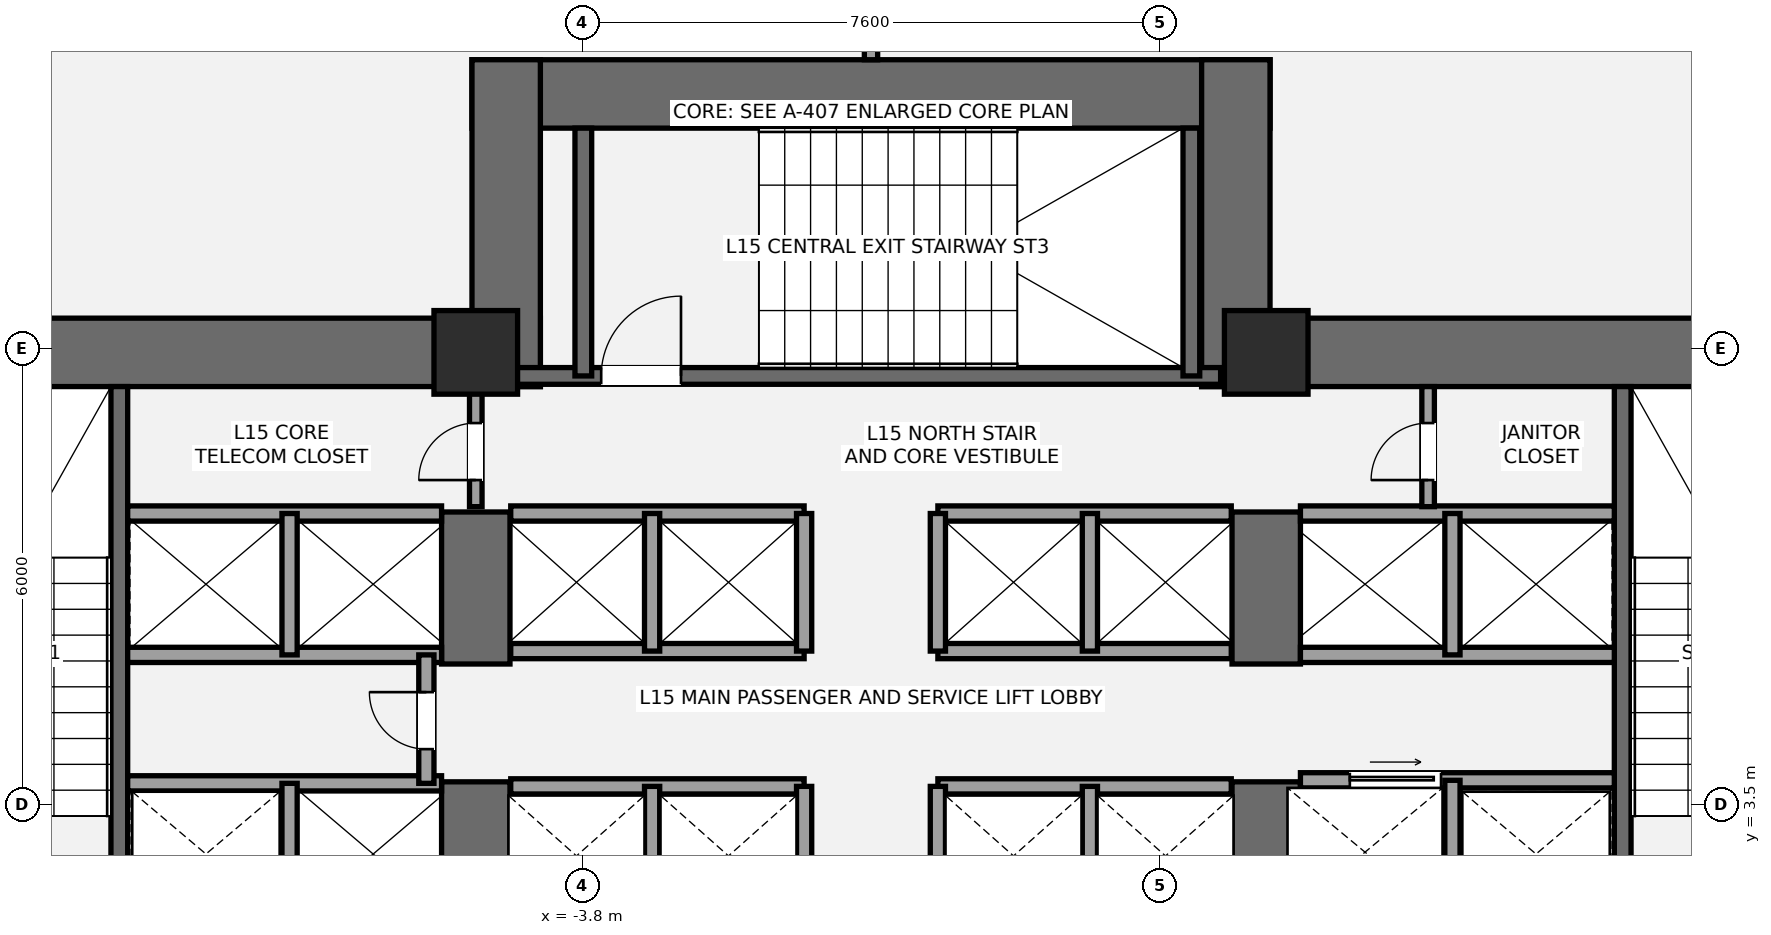
"""IFC4 building model, lengths in metres.
Left out: names, types, materials, properties, quantities, classifications, styles, units other than length and angle.
Written with IfcOpenShell. Run it as: python <this file> out.ifc"""

import sys

from ifc_helpers import new_model, si_unit, direction, frame, frame_2d, origin, origin_2d, place, context, subcontext, project, spatial, rectangle, extrude, element, fill, save


model = new_model("IFC4")
c1 = context("Model", 3, precision=1e-05, world=origin(), true_north=direction((0.0, 1.0)))
c2 = subcontext(c1, "Body", "Model", "MODEL_VIEW")
j1 = project(units=[si_unit("LENGTHUNIT", "METRE"), si_unit("PLANEANGLEUNIT", "RADIAN")], contexts=[c1])
p1 = place(None, origin())
s1 = spatial("IfcSite", under=j1, at=p1, CompositionType="ELEMENT")
p2 = place(p1, origin())
s2 = spatial("IfcBuilding", under=s1, at=p2, CompositionType="ELEMENT")
p3 = place(p2, frame((0.0, 0.0, 59.4)))
s3 = spatial("IfcBuildingStorey", under=s2, at=p3, CompositionType="ELEMENT", Elevation=59.4)
p4 = place(p3, frame((-14.05, 9.45, 0.0), z_axis=(0.0, 0.0, 1.0), x_axis=(1.0, 0.0, 0.0)))
e1 = element("IfcWall", 1, at=p4, inside=s3, PredefinedType="SHEAR", context=c2, shape_type="SweptSolid", body=[
    extrude(rectangle(XDim=9.7, YDim=0.9, at=frame_2d((4.85, 0.0))), origin(), (0.0, 0.0, 1.0), 3.6),
])
p5 = place(p3, frame((-5.2, 0.95, 0.0), z_axis=(0.0, 0.0, 1.0), x_axis=(0.0, 1.0, 0.0)))
e2 = element("IfcWall", 2, at=p5, inside=s3, PredefinedType="SHEAR", context=c2, shape_type="SweptSolid", body=[
    extrude(rectangle(XDim=2.85, YDim=0.9, at=frame_2d((1.425, 0.0))), origin(), (0.0, 0.0, 1.0), 3.6),
])
p6 = place(p3, frame((-5.2, 5.35, 0.0), z_axis=(0.0, 0.0, 1.0), x_axis=(0.0, 1.0, 0.0)))
e3 = element("IfcWall", 3, at=p6, inside=s3, PredefinedType="SHEAR", context=c2, shape_type="SweptSolid", body=[
    extrude(rectangle(XDim=2.0, YDim=0.9, at=frame_2d((1.0, 0.0))), origin(), (0.0, 0.0, 1.0), 3.6),
])
p7 = place(p3, frame((-9.89, 1.85, 0.0), z_axis=(0.0, 0.0, 1.0), x_axis=(0.0, 1.0, 0.0)))
e4 = element("IfcWall", 4, at=p7, inside=s3, PredefinedType="SHEAR", context=c2, shape_type="SweptSolid", body=[
    extrude(rectangle(XDim=7.15, YDim=0.22, at=frame_2d((3.575, 0.0))), origin(), (0.0, 0.0, 1.0), 3.6),
])
p8 = place(p3, frame((4.35, 9.45, 0.0), z_axis=(0.0, 0.0, 1.0), x_axis=(1.0, 0.0, 0.0)))
e5 = element("IfcWall", 5, at=p8, inside=s3, PredefinedType="SHEAR", context=c2, shape_type="SweptSolid", body=[
    extrude(rectangle(XDim=9.7, YDim=0.9, at=frame_2d((4.85, 0.0))), origin(), (0.0, 0.0, 1.0), 3.6),
])
p9 = place(p3, frame((5.2, 0.95, 0.0), z_axis=(0.0, 0.0, 1.0), x_axis=(0.0, 1.0, 0.0)))
e6 = element("IfcWall", 6, at=p9, inside=s3, PredefinedType="SHEAR", context=c2, shape_type="SweptSolid", body=[
    extrude(rectangle(XDim=2.85, YDim=0.9, at=frame_2d((1.425, 0.0))), origin(), (0.0, 0.0, 1.0), 3.6),
])
p10 = place(p3, frame((5.2, 5.35, 0.0), z_axis=(0.0, 0.0, 1.0), x_axis=(0.0, 1.0, 0.0)))
e7 = element("IfcWall", 7, at=p10, inside=s3, PredefinedType="SHEAR", context=c2, shape_type="SweptSolid", body=[
    extrude(rectangle(XDim=2.0, YDim=0.9, at=frame_2d((1.0, 0.0))), origin(), (0.0, 0.0, 1.0), 3.6),
])
p11 = place(p3, frame((9.89, 1.85, 0.0), z_axis=(0.0, 0.0, 1.0), x_axis=(0.0, 1.0, 0.0)))
e8 = element("IfcWall", 8, at=p11, inside=s3, PredefinedType="SHEAR", context=c2, shape_type="SweptSolid", body=[
    extrude(rectangle(XDim=7.15, YDim=0.22, at=frame_2d((3.575, 0.0))), origin(), (0.0, 0.0, 1.0), 3.6),
])
p12 = place(p3, frame((-5.25, 12.85, 0.0), z_axis=(0.0, 0.0, 1.0), x_axis=(1.0, 0.0, 0.0)))
e9 = element("IfcWall", 9, at=p12, inside=s3, PredefinedType="SHEAR", context=c2, shape_type="SweptSolid", body=[
    extrude(rectangle(XDim=10.5, YDim=0.9, at=frame_2d((5.25, 0.0))), origin(), (0.0, 0.0, 1.0), 3.6),
])
for number, where, z_axis, x_axis in (
    (10, (-4.8, 9.0, 0.0), (0.0, 0.0, 1.0), (0.0, 1.0, 0.0)),
    (11, (4.8, 9.0, 0.0), (0.0, 0.0, 1.0), (0.0, 1.0, 0.0)),
):
    element("IfcWall", number, at=place(p3, frame(where, z_axis=z_axis, x_axis=x_axis)), inside=s3, PredefinedType="SHEAR", context=c2, shape_type="SweptSolid", body=[
        extrude(rectangle(XDim=4.3, YDim=0.9, at=frame_2d((2.15, 0.0))), origin(), (0.0, 0.0, 1.0), 3.6),
    ])
p13 = place(p3, frame((-4.7, 9.14, 0.0), z_axis=(0.0, 0.0, 1.0), x_axis=(1.0, 0.0, 0.0)))
e12 = element("IfcWall", 12, at=p13, inside=s3, PredefinedType="SHEAR", context=c2, shape_type="SweptSolid", body=[
    extrude(rectangle(XDim=9.3, YDim=0.22, at=frame_2d((4.65, 0.0))), origin(), (0.0, 0.0, 1.0), 3.6),
])
p14 = place(p13, frame((1.15, 0.0, 0.0)))
e13 = element("IfcOpeningElement", 13, at=p14, cuts=e12, PredefinedType="OPENING", context=c2, shape_type="SweptSolid", body=[
    extrude(rectangle(XDim=1.05, YDim=2.15, at=frame_2d((0.525, 1.075))), frame((0.0, 0.12, 0.0), z_axis=(0.0, -1.0, 0.0), x_axis=(1.0, 0.0, 0.0)), (0.0, 0.0, 1.0), 0.24),
])
for number, where, z_axis, x_axis in (
    (14, (-3.785, 9.14, 0.0), (0.0, 0.0, 1.0), (0.0, 1.0, 0.0)),
    (15, (4.215, 9.14, 0.0), (0.0, 0.0, 1.0), (0.0, 1.0, 0.0)),
):
    element("IfcWall", number, at=place(p3, frame(where, z_axis=z_axis, x_axis=x_axis)), inside=s3, PredefinedType="SHEAR", context=c2, shape_type="SweptSolid", body=[
        extrude(rectangle(XDim=3.26, YDim=0.22, at=frame_2d((1.63, 0.0))), origin(), (0.0, 0.0, 1.0), 3.6),
    ])
for number, where, z_axis, x_axis in (
    (16, (-5.2, 9.45, 0.0), (0.0, 0.0, 1.0), (1.0, 0.0, 0.0)),
    (17, (5.2, 9.45, 0.0), (0.0, 0.0, 1.0), (1.0, 0.0, 0.0)),
):
    element("IfcColumn", number, at=place(p3, frame(where, z_axis=z_axis, x_axis=x_axis)), inside=s3, PredefinedType="COLUMN", context=c2, shape_type="SweptSolid", body=[
        extrude(rectangle(XDim=1.1, YDim=1.1, at=origin_2d()), origin(), (0.0, 0.0, 1.0), 3.6),
    ])
p15 = place(p3, frame((-9.78, 3.78, 0.0), z_axis=(0.0, 0.0, 1.0), x_axis=(1.0, 0.0, 0.0)))
e18 = element("IfcWall", 18, at=p15, inside=s3, PredefinedType="SOLIDWALL", context=c2, shape_type="SweptSolid", body=[
    extrude(rectangle(XDim=4.13, YDim=0.2, at=frame_2d((2.065, 0.0))), origin(), (0.0, 0.0, 1.0), 3.4),
])
p16 = place(p3, frame((-7.65, 1.85, 0.0), z_axis=(0.0, 0.0, 1.0), x_axis=(0.0, 1.0, 0.0)))
e19 = element("IfcWall", 19, at=p16, inside=s3, PredefinedType="SOLIDWALL", context=c2, shape_type="SweptSolid", body=[
    extrude(rectangle(XDim=1.93, YDim=0.2, at=frame_2d((0.965, 0.0))), origin(), (0.0, 0.0, 1.0), 3.4),
])
for number, where, z_axis, x_axis in (
    (20, (-9.78, 5.47, 0.0), (0.0, 0.0, 1.0), (1.0, 0.0, 0.0)),
    (21, (-9.78, 7.33, 0.0), (0.0, 0.0, 1.0), (1.0, 0.0, 0.0)),
):
    element("IfcWall", number, at=place(p3, frame(where, z_axis=z_axis, x_axis=x_axis)), inside=s3, PredefinedType="SOLIDWALL", context=c2, shape_type="SweptSolid", body=[
        extrude(rectangle(XDim=4.13, YDim=0.2, at=frame_2d((2.065, 0.0))), origin(), (0.0, 0.0, 1.0), 3.4),
    ])
p17 = place(p3, frame((-7.65, 5.47, 0.0), z_axis=(0.0, 0.0, 1.0), x_axis=(0.0, 1.0, 0.0)))
e22 = element("IfcWall", 22, at=p17, inside=s3, PredefinedType="SOLIDWALL", context=c2, shape_type="SweptSolid", body=[
    extrude(rectangle(XDim=1.86, YDim=0.2, at=frame_2d((0.93, 0.0))), origin(), (0.0, 0.0, 1.0), 3.4),
])
p18 = place(p3, frame((-5.85, 3.78, 0.0), z_axis=(0.0, 0.0, 1.0), x_axis=(0.0, 1.0, 0.0)))
e23 = element("IfcWall", 23, at=p18, inside=s3, PredefinedType="SOLIDWALL", context=c2, shape_type="SweptSolid", body=[
    extrude(rectangle(XDim=1.69, YDim=0.2, at=frame_2d((0.845, 0.0))), origin(), (0.0, 0.0, 1.0), 3.4),
])
p19 = place(p18, frame((0.45, 0.0, 0.0)))
e24 = element("IfcOpeningElement", 24, at=p19, cuts=e23, PredefinedType="OPENING", context=c2, shape_type="SweptSolid", body=[
    extrude(rectangle(XDim=0.75, YDim=2.1, at=frame_2d((0.375, 1.05))), frame((0.0, 0.11, 0.0), z_axis=(0.0, -1.0, 0.0), x_axis=(1.0, 0.0, 0.0)), (0.0, 0.0, 1.0), 0.22),
])
p20 = place(p3, frame((5.65, 3.82, 0.0), z_axis=(0.0, 0.0, 1.0), x_axis=(1.0, 0.0, 0.0)))
e25 = element("IfcWall", 25, at=p20, inside=s3, PredefinedType="SOLIDWALL", context=c2, shape_type="SweptSolid", body=[
    extrude(rectangle(XDim=4.13, YDim=0.2, at=frame_2d((2.065, 0.0))), origin(), (0.0, 0.0, 1.0), 3.4),
])
p21 = place(p20, frame((0.65, 0.0, 0.0)))
e26 = element("IfcOpeningElement", 26, at=p21, cuts=e25, PredefinedType="OPENING", context=c2, shape_type="SweptSolid", body=[
    extrude(rectangle(XDim=1.2, YDim=2.2, at=frame_2d((0.6, 1.1))), frame((0.0, 0.11, 0.0), z_axis=(0.0, -1.0, 0.0), x_axis=(1.0, 0.0, 0.0)), (0.0, 0.0, 1.0), 0.22),
])
p22 = place(p3, frame((7.65, 1.85, 0.0), z_axis=(0.0, 0.0, 1.0), x_axis=(0.0, 1.0, 0.0)))
e27 = element("IfcWall", 27, at=p22, inside=s3, PredefinedType="SOLIDWALL", context=c2, shape_type="SweptSolid", body=[
    extrude(rectangle(XDim=1.97, YDim=0.2, at=frame_2d((0.985, 0.0))), origin(), (0.0, 0.0, 1.0), 3.4),
])
for number, where, z_axis, x_axis in (
    (28, (5.65, 5.47, 0.0), (0.0, 0.0, 1.0), (1.0, 0.0, 0.0)),
    (29, (5.65, 7.33, 0.0), (0.0, 0.0, 1.0), (1.0, 0.0, 0.0)),
):
    element("IfcWall", number, at=place(p3, frame(where, z_axis=z_axis, x_axis=x_axis)), inside=s3, PredefinedType="SOLIDWALL", context=c2, shape_type="SweptSolid", body=[
        extrude(rectangle(XDim=4.13, YDim=0.2, at=frame_2d((2.065, 0.0))), origin(), (0.0, 0.0, 1.0), 3.4),
    ])
p23 = place(p3, frame((7.65, 5.47, 0.0), z_axis=(0.0, 0.0, 1.0), x_axis=(0.0, 1.0, 0.0)))
e30 = element("IfcWall", 30, at=p23, inside=s3, PredefinedType="SOLIDWALL", context=c2, shape_type="SweptSolid", body=[
    extrude(rectangle(XDim=1.86, YDim=0.2, at=frame_2d((0.93, 0.0))), origin(), (0.0, 0.0, 1.0), 3.4),
])
for number, where, z_axis, x_axis in (
    (31, (-4.74, 3.74, 0.0), (0.0, 0.0, 1.0), (1.0, 0.0, 0.0)),
    (32, (0.88, 3.74, 0.0), (0.0, 0.0, 1.0), (1.0, 0.0, 0.0)),
):
    element("IfcWall", number, at=place(p3, frame(where, z_axis=z_axis, x_axis=x_axis)), inside=s3, PredefinedType="SOLIDWALL", context=c2, shape_type="SweptSolid", body=[
        extrude(rectangle(XDim=3.86, YDim=0.2, at=frame_2d((1.93, 0.0))), origin(), (0.0, 0.0, 1.0), 3.4),
    ])
for number, where, z_axis, x_axis in (
    (33, (-2.88, 1.92, 0.0), (0.0, 0.0, 1.0), (0.0, 1.0, 0.0)),
    (34, (2.88, 1.92, 0.0), (0.0, 0.0, 1.0), (0.0, 1.0, 0.0)),
    (35, (-0.88, 1.92, 0.0), (0.0, 0.0, 1.0), (0.0, 1.0, 0.0)),
    (36, (0.88, 1.92, 0.0), (0.0, 0.0, 1.0), (0.0, 1.0, 0.0)),
):
    element("IfcWall", number, at=place(p3, frame(where, z_axis=z_axis, x_axis=x_axis)), inside=s3, PredefinedType="SOLIDWALL", context=c2, shape_type="SweptSolid", body=[
        extrude(rectangle(XDim=1.82, YDim=0.2, at=frame_2d((0.91, 0.0))), origin(), (0.0, 0.0, 1.0), 3.4),
    ])
for number, where, z_axis, x_axis in (
    (37, (-4.74, 5.52, 0.0), (0.0, 0.0, 1.0), (1.0, 0.0, 0.0)),
    (38, (0.88, 5.52, 0.0), (0.0, 0.0, 1.0), (1.0, 0.0, 0.0)),
    (39, (-4.74, 7.33, 0.0), (0.0, 0.0, 1.0), (1.0, 0.0, 0.0)),
    (40, (0.88, 7.33, 0.0), (0.0, 0.0, 1.0), (1.0, 0.0, 0.0)),
):
    element("IfcWall", number, at=place(p3, frame(where, z_axis=z_axis, x_axis=x_axis)), inside=s3, PredefinedType="SOLIDWALL", context=c2, shape_type="SweptSolid", body=[
        extrude(rectangle(XDim=3.86, YDim=0.2, at=frame_2d((1.93, 0.0))), origin(), (0.0, 0.0, 1.0), 3.4),
    ])
for number, where, z_axis, x_axis in (
    (41, (-2.88, 5.52, 0.0), (0.0, 0.0, 1.0), (0.0, 1.0, 0.0)),
    (42, (2.88, 5.52, 0.0), (0.0, 0.0, 1.0), (0.0, 1.0, 0.0)),
    (43, (-0.88, 5.52, 0.0), (0.0, 0.0, 1.0), (0.0, 1.0, 0.0)),
    (44, (0.88, 5.52, 0.0), (0.0, 0.0, 1.0), (0.0, 1.0, 0.0)),
):
    element("IfcWall", number, at=place(p3, frame(where, z_axis=z_axis, x_axis=x_axis)), inside=s3, PredefinedType="SOLIDWALL", context=c2, shape_type="SweptSolid", body=[
        extrude(rectangle(XDim=1.81, YDim=0.2, at=frame_2d((0.905, 0.0))), origin(), (0.0, 0.0, 1.0), 3.4),
    ])
p24 = place(p3, frame((-5.2, 7.42, 0.0), z_axis=(0.0, 0.0, 1.0), x_axis=(0.0, 1.0, 0.0)))
e45 = element("IfcWall", 45, at=p24, inside=s3, PredefinedType="PARTITIONING", context=c2, shape_type="SweptSolid", body=[
    extrude(rectangle(XDim=1.58, YDim=0.165, at=frame_2d((0.79, 0.0))), origin(), (0.0, 0.0, 1.0), 3.4),
])
p25 = place(p24, frame((0.35, 0.0, 0.0)))
e46 = element("IfcOpeningElement", 46, at=p25, cuts=e45, PredefinedType="OPENING", context=c2, shape_type="SweptSolid", body=[
    extrude(rectangle(XDim=0.75, YDim=2.1, at=frame_2d((0.375, 1.05))), frame((0.0, 0.093, 0.0), z_axis=(0.0, -1.0, 0.0), x_axis=(1.0, 0.0, 0.0)), (0.0, 0.0, 1.0), 0.185),
])
p26 = place(p3, frame((7.33, 7.42, 0.0), z_axis=(0.0, 0.0, 1.0), x_axis=(0.0, 1.0, 0.0)))
e47 = element("IfcWall", 47, at=p26, inside=s3, PredefinedType="PARTITIONING", context=c2, shape_type="SweptSolid", body=[
    extrude(rectangle(XDim=1.58, YDim=0.165, at=frame_2d((0.79, 0.0))), origin(), (0.0, 0.0, 1.0), 3.4),
])
p27 = place(p26, frame((0.35, 0.0, 0.0)))
e48 = element("IfcOpeningElement", 48, at=p27, cuts=e47, PredefinedType="OPENING", context=c2, shape_type="SweptSolid", body=[
    extrude(rectangle(XDim=0.75, YDim=2.1, at=frame_2d((0.375, 1.05))), frame((0.0, 0.093, 0.0), z_axis=(0.0, -1.0, 0.0), x_axis=(1.0, 0.0, 0.0)), (0.0, 0.0, 1.0), 0.185),
])
p28 = place(p3, frame((0.0, 13.3, 0.0), z_axis=(0.0, 0.0, 1.0), x_axis=(0.0, 1.0, 0.0)))
e49 = element("IfcWall", 49, at=p28, inside=s3, PredefinedType="PARTITIONING", context=c2, shape_type="SweptSolid", body=[
    extrude(rectangle(XDim=5.952, YDim=0.175, at=frame_2d((2.976, 0.0))), origin(), (0.0, 0.0, 1.0), 3.4),
])
p29 = place(p14, origin())
e50 = element("IfcDoor", 50, at=p29, inside=s3, OperationType="SINGLE_SWING_RIGHT", PredefinedType="DOOR", context=c2, shape_type="SweptSolid", body=[
    extrude(rectangle(XDim=1.05, YDim=2.15, at=frame_2d((0.525, 1.075))), frame((0.0, 0.025, 0.0), z_axis=(0.0, -1.0, 0.0), x_axis=(1.0, 0.0, 0.0)), (0.0, 0.0, 1.0), 0.05),
])
fill(e13, e50)
p30 = place(p19, origin())
e51 = element("IfcDoor", 51, at=p30, inside=s3, OperationType="SINGLE_SWING_RIGHT", PredefinedType="DOOR", context=c2, shape_type="SweptSolid", body=[
    extrude(rectangle(XDim=0.75, YDim=2.1, at=frame_2d((0.375, 1.05))), frame((0.0, 0.025, 0.0), z_axis=(0.0, -1.0, 0.0), x_axis=(1.0, 0.0, 0.0)), (0.0, 0.0, 1.0), 0.05),
])
fill(e24, e51)
p31 = place(p21, origin())
e52 = element("IfcDoor", 52, at=p31, inside=s3, OperationType="SLIDING_TO_RIGHT", PredefinedType="DOOR", context=c2, shape_type="SweptSolid", body=[
    extrude(rectangle(XDim=1.2, YDim=2.2, at=frame_2d((0.6, 1.1))), frame((0.0, 0.025, 0.0), z_axis=(0.0, -1.0, 0.0), x_axis=(1.0, 0.0, 0.0)), (0.0, 0.0, 1.0), 0.05),
])
fill(e26, e52)
p32 = place(p25, origin())
e53 = element("IfcDoor", 53, at=p32, inside=s3, OperationType="SINGLE_SWING_LEFT", PredefinedType="DOOR", context=c2, shape_type="SweptSolid", body=[
    extrude(rectangle(XDim=0.75, YDim=2.1, at=frame_2d((0.375, 1.05))), frame((0.0, 0.025, 0.0), z_axis=(0.0, -1.0, 0.0), x_axis=(1.0, 0.0, 0.0)), (0.0, 0.0, 1.0), 0.05),
])
fill(e46, e53)
p33 = place(p27, origin())
e54 = element("IfcDoor", 54, at=p33, inside=s3, OperationType="SINGLE_SWING_LEFT", PredefinedType="DOOR", context=c2, shape_type="SweptSolid", body=[
    extrude(rectangle(XDim=0.75, YDim=2.1, at=frame_2d((0.375, 1.05))), frame((0.0, 0.025, 0.0), z_axis=(0.0, -1.0, 0.0), x_axis=(1.0, 0.0, 0.0)), (0.0, 0.0, 1.0), 0.05),
])
fill(e48, e54)
save(model, sys.argv[1])
